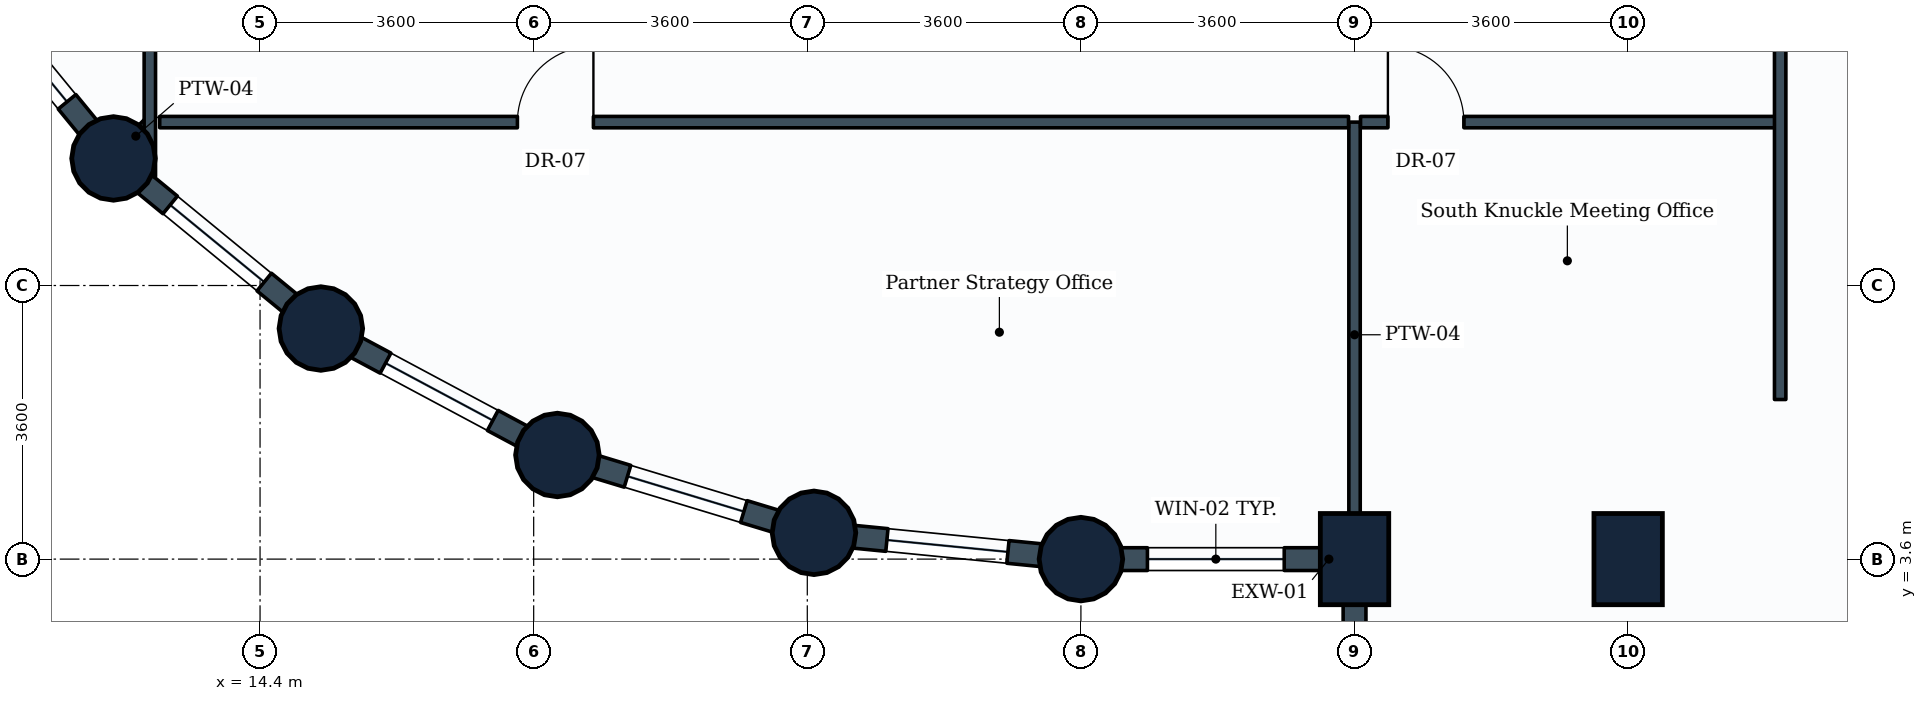
"""IFC4 building model, lengths in metres.
Left out: names, types, materials, properties, quantities, classifications, styles, units other than length and angle.
Written with IfcOpenShell. Run it as: python <this file> out.ifc"""

import sys

from ifc_helpers import new_model, si_unit, direction, frame, frame_2d, origin, origin_2d, place, context, subcontext, project, spatial, rectangle, circle, extrude, element, fill, save


model = new_model("IFC4")
c1 = context("Model", 3, precision=1e-05, world=origin(), true_north=direction((0.0, 1.0)))
c2 = subcontext(c1, "Body", "Model", "MODEL_VIEW")
j1 = project(units=[si_unit("LENGTHUNIT", "METRE"), si_unit("PLANEANGLEUNIT", "RADIAN")], contexts=[c1])
p1 = place(None, origin())
s1 = spatial("IfcSite", under=j1, at=p1, CompositionType="ELEMENT")
p2 = place(p1, origin())
s2 = spatial("IfcBuilding", under=s1, at=p2, CompositionType="ELEMENT")
p3 = place(p2, frame((0.0, 0.0, 31.8)))
s3 = spatial("IfcBuildingStorey", under=s2, at=p3, CompositionType="ELEMENT", Elevation=31.8)
for number, where, z_axis, x_axis in (
    (1, (12.472, 8.872, 0.0), (0.0, 0.0, 1.0), (1.0, 0.0, 0.0)),
    (2, (15.2, 6.634, 0.0), (0.0, 0.0, 1.0), (1.0, 0.0, 0.0)),
    (3, (18.312, 4.97, 0.0), (0.0, 0.0, 1.0), (1.0, 0.0, 0.0)),
    (4, (21.688, 3.946, 0.0), (0.0, 0.0, 1.0), (1.0, 0.0, 0.0)),
    (5, (25.2, 3.6, 0.0), (0.0, 0.0, 1.0), (1.0, 0.0, 0.0)),
):
    element("IfcColumn", number, at=place(p3, frame(where, z_axis=z_axis, x_axis=x_axis)), inside=s3, PredefinedType="COLUMN", context=c2, shape_type="SweptSolid", body=[
        extrude(circle(Radius=0.55, at=origin_2d()), origin(), (0.0, 0.0, 1.0), 3.9),
    ])
for number, where, z_axis, x_axis in (
    (6, (28.8, 3.6, 0.0), (0.0, 0.0, 1.0), (1.0, 0.0, 0.0)),
    (7, (32.4, 3.6, 0.0), (0.0, 0.0, 1.0), (1.0, 0.0, 0.0)),
):
    element("IfcColumn", number, at=place(p3, frame(where, z_axis=z_axis, x_axis=x_axis)), inside=s3, PredefinedType="COLUMN", context=c2, shape_type="SweptSolid", body=[
        extrude(rectangle(XDim=0.9, YDim=1.2, at=origin_2d()), origin(), (0.0, 0.0, 1.0), 3.9),
    ])
p4 = place(p3, frame((28.8, 3.6, 0.0), z_axis=(0.0, 0.0, 1.0), x_axis=(-1.0, 0.0, 0.0)))
e8 = element("IfcWall", 8, at=p4, inside=s3, PredefinedType="STANDARD", context=c2, shape_type="SweptSolid", body=[
    extrude(rectangle(XDim=3.6, YDim=0.3, at=frame_2d((1.8, 0.0))), origin(), (0.0, 0.0, 1.0), 2.93),
])
p5 = place(p4, frame((0.925, 0.0, 0.85)))
e9 = element("IfcOpeningElement", 9, at=p5, cuts=e8, PredefinedType="OPENING", context=c2, shape_type="SweptSolid", body=[
    extrude(rectangle(XDim=1.8, YDim=1.35, at=frame_2d((0.9, 0.675))), frame((0.0, 0.16, 0.0), z_axis=(0.0, -1.0, 0.0), x_axis=(1.0, 0.0, 0.0)), (0.0, 0.0, 1.0), 0.32),
])
p6 = place(p3, frame((28.8, 1.5, 0.0), z_axis=(0.0, 0.0, 1.0), x_axis=(0.0, 1.0, 0.0)))
e10 = element("IfcWall", 10, at=p6, inside=s3, PredefinedType="STANDARD", context=c2, shape_type="SweptSolid", body=[
    extrude(rectangle(XDim=2.1, YDim=0.3, at=frame_2d((1.05, 0.0))), origin(), (0.0, 0.0, 1.0), 2.93),
])
p7 = place(p3, frame((12.472, 8.872, 0.0), z_axis=(0.0, 0.0, 1.0), x_axis=(-0.634258295121, 0.773121216285, 0.0)))
e11 = element("IfcWall", 11, at=p7, inside=s3, PredefinedType="STANDARD", context=c2, shape_type="SweptSolid", body=[
    extrude(rectangle(XDim=3.529, YDim=0.3, at=frame_2d((1.764, 0.0))), origin(), (0.0, 0.0, 1.0), 2.93),
])
p8 = place(p7, frame((0.964, 0.0, 0.85)))
e12 = element("IfcOpeningElement", 12, at=p8, cuts=e11, PredefinedType="OPENING", context=c2, shape_type="SweptSolid", body=[
    extrude(rectangle(XDim=1.6, YDim=1.35, at=frame_2d((0.8, 0.675))), frame((0.0, 0.16, 0.0), z_axis=(0.0, -1.0, 0.0), x_axis=(1.0, 0.0, 0.0)), (0.0, 0.0, 1.0), 0.32),
])
p9 = place(p3, frame((15.2, 6.634, 0.0), z_axis=(0.0, 0.0, 1.0), x_axis=(-0.773121216285, 0.634258295121, 0.0)))
e13 = element("IfcWall", 13, at=p9, inside=s3, PredefinedType="STANDARD", context=c2, shape_type="SweptSolid", body=[
    extrude(rectangle(XDim=3.529, YDim=0.3, at=frame_2d((1.764, 0.0))), origin(), (0.0, 0.0, 1.0), 2.93),
])
p10 = place(p9, frame((0.964, 0.0, 0.85)))
e14 = element("IfcOpeningElement", 14, at=p10, cuts=e13, PredefinedType="OPENING", context=c2, shape_type="SweptSolid", body=[
    extrude(rectangle(XDim=1.6, YDim=1.35, at=frame_2d((0.8, 0.675))), frame((0.0, 0.16, 0.0), z_axis=(0.0, -1.0, 0.0), x_axis=(1.0, 0.0, 0.0)), (0.0, 0.0, 1.0), 0.32),
])
p11 = place(p3, frame((18.312, 4.97, 0.0), z_axis=(0.0, 0.0, 1.0), x_axis=(-0.881846862014, 0.471535907389, 0.0)))
e15 = element("IfcWall", 15, at=p11, inside=s3, PredefinedType="STANDARD", context=c2, shape_type="SweptSolid", body=[
    extrude(rectangle(XDim=3.529, YDim=0.3, at=frame_2d((1.765, 0.0))), origin(), (0.0, 0.0, 1.0), 2.93),
])
p12 = place(p11, frame((0.964, 0.0, 0.85)))
e16 = element("IfcOpeningElement", 16, at=p12, cuts=e15, PredefinedType="OPENING", context=c2, shape_type="SweptSolid", body=[
    extrude(rectangle(XDim=1.6, YDim=1.35, at=frame_2d((0.8, 0.675))), frame((0.0, 0.16, 0.0), z_axis=(0.0, -1.0, 0.0), x_axis=(1.0, 0.0, 0.0)), (0.0, 0.0, 1.0), 0.32),
])
p13 = place(p3, frame((21.688, 3.946, 0.0), z_axis=(0.0, 0.0, 1.0), x_axis=(-0.956953367403, 0.290241714123, 0.0)))
e17 = element("IfcWall", 17, at=p13, inside=s3, PredefinedType="STANDARD", context=c2, shape_type="SweptSolid", body=[
    extrude(rectangle(XDim=3.528, YDim=0.3, at=frame_2d((1.764, 0.0))), origin(), (0.0, 0.0, 1.0), 2.93),
])
p14 = place(p13, frame((0.964, 0.0, 0.85)))
e18 = element("IfcOpeningElement", 18, at=p14, cuts=e17, PredefinedType="OPENING", context=c2, shape_type="SweptSolid", body=[
    extrude(rectangle(XDim=1.6, YDim=1.35, at=frame_2d((0.8, 0.675))), frame((0.0, 0.16, 0.0), z_axis=(0.0, -1.0, 0.0), x_axis=(1.0, 0.0, 0.0)), (0.0, 0.0, 1.0), 0.32),
])
p15 = place(p3, frame((25.2, 3.6, 0.0), z_axis=(0.0, 0.0, 1.0), x_axis=(-0.995183369056, 0.098030923459, 0.0)))
e19 = element("IfcWall", 19, at=p15, inside=s3, PredefinedType="STANDARD", context=c2, shape_type="SweptSolid", body=[
    extrude(rectangle(XDim=3.529, YDim=0.3, at=frame_2d((1.765, 0.0))), origin(), (0.0, 0.0, 1.0), 2.93),
])
p16 = place(p15, frame((0.965, 0.0, 0.85)))
e20 = element("IfcOpeningElement", 20, at=p16, cuts=e19, PredefinedType="OPENING", context=c2, shape_type="SweptSolid", body=[
    extrude(rectangle(XDim=1.6, YDim=1.35, at=frame_2d((0.8, 0.675))), frame((0.0, 0.16, 0.0), z_axis=(0.0, -1.0, 0.0), x_axis=(1.0, 0.0, 0.0)), (0.0, 0.0, 1.0), 0.32),
])
p17 = place(p3, frame((28.8, 9.35, 0.0), z_axis=(0.0, 0.0, 1.0), x_axis=(0.0, -1.0, 0.0)))
e21 = element("IfcWall", 21, at=p17, inside=s3, PredefinedType="PARTITIONING", context=c2, shape_type="SweptSolid", body=[
    extrude(rectangle(XDim=5.596, YDim=0.15, at=frame_2d((2.798, 0.0))), origin(), (0.0, 0.0, 1.0), 3.635),
])
p18 = place(p3, frame((12.95, 9.35, 0.0), z_axis=(0.0, 0.0, 1.0), x_axis=(-0.707106781187, -0.707106781187, 0.0)))
e22 = element("IfcWall", 22, at=p18, inside=s3, PredefinedType="PARTITIONING", context=c2, shape_type="SweptSolid", body=[
    extrude(rectangle(XDim=0.522, YDim=0.15, at=frame_2d((0.261, 0.0))), origin(), (0.0, 0.0, 1.0), 3.08),
])
p19 = place(p3, frame((12.95, 8.634, 0.0), z_axis=(0.0, 0.0, 1.0), x_axis=(0.0, 1.0, 0.0)))
e23 = element("IfcWall", 23, at=p19, inside=s3, PredefinedType="PARTITIONING", context=c2, shape_type="SweptSolid", body=[
    extrude(rectangle(XDim=16.487, YDim=0.15, at=frame_2d((8.244, 0.0))), origin(), (0.0, 0.0, 1.0), 2.93),
])
p20 = place(p19, frame((7.706, 0.0, 0.0)))
e24 = element("IfcOpeningElement", 24, at=p20, cuts=e23, PredefinedType="OPENING", context=c2, shape_type="SweptSolid", body=[
    extrude(rectangle(XDim=1.0, YDim=2.1, at=frame_2d((0.5, 1.05))), frame((0.0, 0.085, 0.0), z_axis=(0.0, -1.0, 0.0), x_axis=(1.0, 0.0, 0.0)), (0.0, 0.0, 1.0), 0.17),
])
p21 = place(p3, frame((13.08, 9.35, 0.0), z_axis=(0.0, 0.0, 1.0), x_axis=(1.0, 0.0, 0.0)))
e25 = element("IfcWall", 25, at=p21, inside=s3, PredefinedType="PARTITIONING", context=c2, shape_type="SweptSolid", body=[
    extrude(rectangle(XDim=15.641, YDim=0.15, at=frame_2d((7.82, 0.0))), origin(), (0.0, 0.0, 1.0), 3.04),
])
p22 = place(p21, frame((4.706, 0.0, 0.0)))
e26 = element("IfcOpeningElement", 26, at=p22, cuts=e25, PredefinedType="OPENING", context=c2, shape_type="SweptSolid", body=[
    extrude(rectangle(XDim=1.0, YDim=2.1, at=frame_2d((0.5, 1.05))), frame((0.0, 0.085, 0.0), z_axis=(0.0, -1.0, 0.0), x_axis=(1.0, 0.0, 0.0)), (0.0, 0.0, 1.0), 0.17),
])
p23 = place(p3, frame((28.879, 9.35, 0.0), z_axis=(0.0, 0.0, 1.0), x_axis=(1.0, 0.0, 0.0)))
e27 = element("IfcWall", 27, at=p23, inside=s3, PredefinedType="PARTITIONING", context=c2, shape_type="SweptSolid", body=[
    extrude(rectangle(XDim=5.521, YDim=0.15, at=frame_2d((2.76, 0.0))), origin(), (0.0, 0.0, 1.0), 3.635),
])
p24 = place(p23, frame((0.36, 0.0, 0.0)))
e28 = element("IfcOpeningElement", 28, at=p24, cuts=e27, PredefinedType="OPENING", context=c2, shape_type="SweptSolid", body=[
    extrude(rectangle(XDim=1.0, YDim=2.1, at=frame_2d((0.5, 1.05))), frame((0.0, 0.085, 0.0), z_axis=(0.0, -1.0, 0.0), x_axis=(1.0, 0.0, 0.0)), (0.0, 0.0, 1.0), 0.17),
])
p25 = place(p3, frame((34.4, 5.7, 0.0), z_axis=(0.0, 0.0, 1.0), x_axis=(0.0, 1.0, 0.0)))
e29 = element("IfcWall", 29, at=p25, inside=s3, PredefinedType="PARTITIONING", context=c2, shape_type="SweptSolid", body=[
    extrude(rectangle(XDim=4.95, YDim=0.15, at=frame_2d((2.475, 0.0))), origin(), (0.0, 0.0, 1.0), 3.635),
])
p26 = place(p5, origin())
e30 = element("IfcWindow", 30, at=p26, inside=s3, PartitioningType="SINGLE_PANEL", PredefinedType="WINDOW", context=c2, shape_type="SweptSolid", body=[
    extrude(rectangle(XDim=1.8, YDim=1.35, at=frame_2d((0.9, 0.675))), frame((0.0, 0.03, 0.0), z_axis=(0.0, -1.0, 0.0), x_axis=(1.0, 0.0, 0.0)), (0.0, 0.0, 1.0), 0.06),
])
fill(e9, e30)
p27 = place(p8, origin())
e31 = element("IfcWindow", 31, at=p27, inside=s3, PartitioningType="SINGLE_PANEL", PredefinedType="WINDOW", context=c2, shape_type="SweptSolid", body=[
    extrude(rectangle(XDim=1.6, YDim=1.35, at=frame_2d((0.8, 0.675))), frame((0.0, 0.03, 0.0), z_axis=(0.0, -1.0, 0.0), x_axis=(1.0, 0.0, 0.0)), (0.0, 0.0, 1.0), 0.06),
])
fill(e12, e31)
p28 = place(p10, origin())
e32 = element("IfcWindow", 32, at=p28, inside=s3, PartitioningType="SINGLE_PANEL", PredefinedType="WINDOW", context=c2, shape_type="SweptSolid", body=[
    extrude(rectangle(XDim=1.6, YDim=1.35, at=frame_2d((0.8, 0.675))), frame((0.0, 0.03, 0.0), z_axis=(0.0, -1.0, 0.0), x_axis=(1.0, 0.0, 0.0)), (0.0, 0.0, 1.0), 0.06),
])
fill(e14, e32)
p29 = place(p12, origin())
e33 = element("IfcWindow", 33, at=p29, inside=s3, PartitioningType="SINGLE_PANEL", PredefinedType="WINDOW", context=c2, shape_type="SweptSolid", body=[
    extrude(rectangle(XDim=1.6, YDim=1.35, at=frame_2d((0.8, 0.675))), frame((0.0, 0.03, 0.0), z_axis=(0.0, -1.0, 0.0), x_axis=(1.0, 0.0, 0.0)), (0.0, 0.0, 1.0), 0.06),
])
fill(e16, e33)
p30 = place(p14, origin())
e34 = element("IfcWindow", 34, at=p30, inside=s3, PartitioningType="SINGLE_PANEL", PredefinedType="WINDOW", context=c2, shape_type="SweptSolid", body=[
    extrude(rectangle(XDim=1.6, YDim=1.35, at=frame_2d((0.8, 0.675))), frame((0.0, 0.03, 0.0), z_axis=(0.0, -1.0, 0.0), x_axis=(1.0, 0.0, 0.0)), (0.0, 0.0, 1.0), 0.06),
])
fill(e18, e34)
p31 = place(p16, origin())
e35 = element("IfcWindow", 35, at=p31, inside=s3, PartitioningType="SINGLE_PANEL", PredefinedType="WINDOW", context=c2, shape_type="SweptSolid", body=[
    extrude(rectangle(XDim=1.6, YDim=1.35, at=frame_2d((0.8, 0.675))), frame((0.0, 0.03, 0.0), z_axis=(0.0, -1.0, 0.0), x_axis=(1.0, 0.0, 0.0)), (0.0, 0.0, 1.0), 0.06),
])
fill(e20, e35)
p32 = place(p22, origin())
e36 = element("IfcDoor", 36, at=p32, inside=s3, OperationType="SINGLE_SWING_RIGHT", PredefinedType="DOOR", context=c2, shape_type="SweptSolid", body=[
    extrude(rectangle(XDim=1.0, YDim=2.1, at=frame_2d((0.5, 1.05))), frame((0.0, 0.025, 0.0), z_axis=(0.0, -1.0, 0.0), x_axis=(1.0, 0.0, 0.0)), (0.0, 0.0, 1.0), 0.05),
])
fill(e26, e36)
p33 = place(p24, origin())
e37 = element("IfcDoor", 37, at=p33, inside=s3, OperationType="SINGLE_SWING_LEFT", PredefinedType="DOOR", context=c2, shape_type="SweptSolid", body=[
    extrude(rectangle(XDim=1.0, YDim=2.1, at=frame_2d((0.5, 1.05))), frame((0.0, 0.025, 0.0), z_axis=(0.0, -1.0, 0.0), x_axis=(1.0, 0.0, 0.0)), (0.0, 0.0, 1.0), 0.05),
])
fill(e28, e37)
save(model, sys.argv[1])
